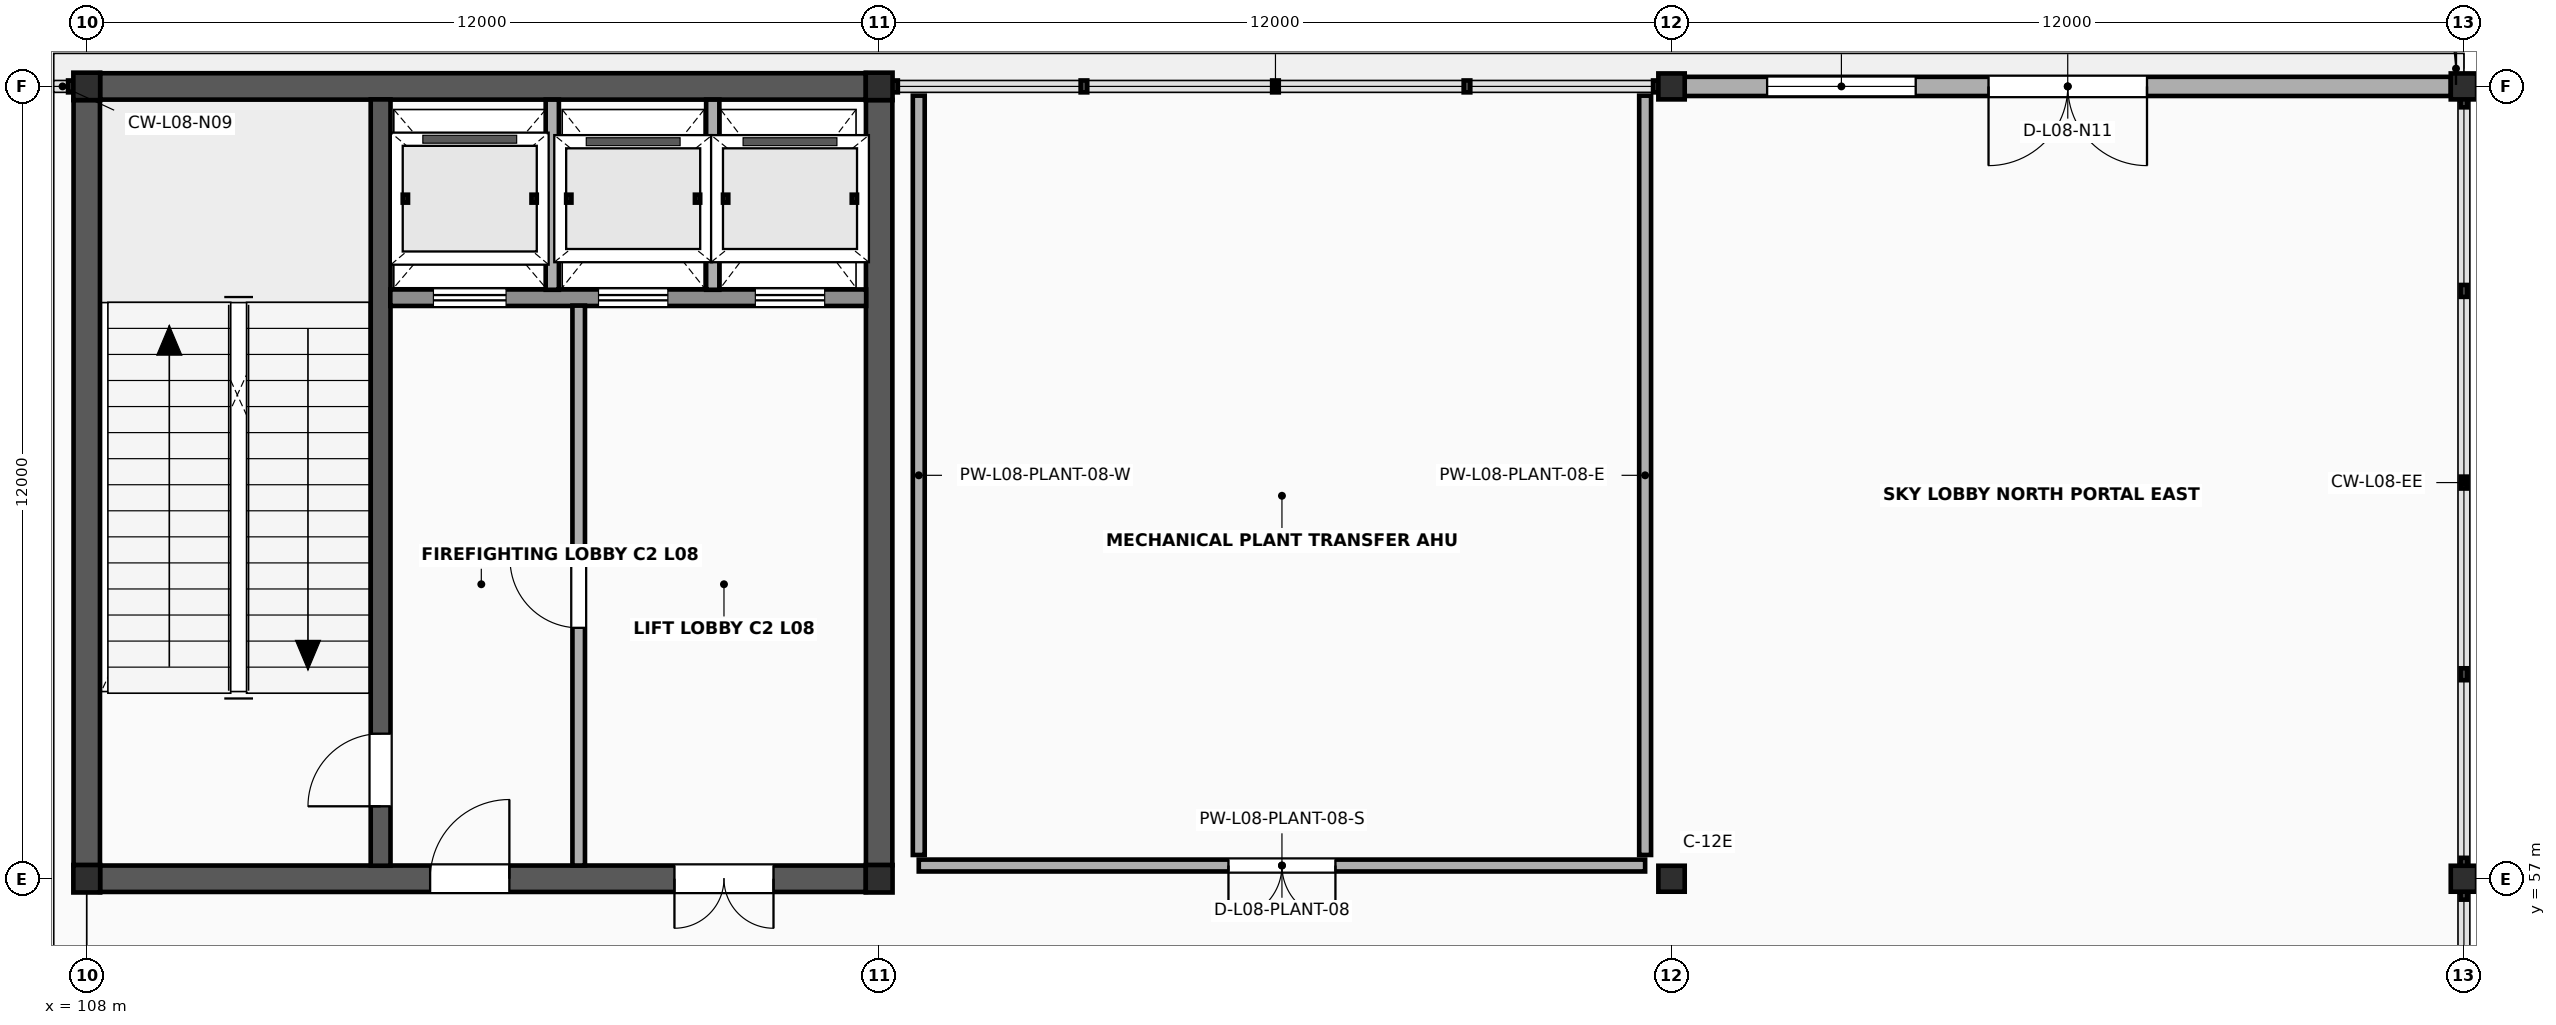
"""IFC4 building model, lengths in metres.
Left out: names, types, materials, properties, quantities, classifications, styles, units other than length and angle.
Written with IfcOpenShell. Run it as: python <this file> out.ifc"""

import sys

from ifc_helpers import new_model, si_unit, direction, frame, frame_2d, origin, origin_2d, place, context, subcontext, project, spatial, rectangle, i_section, extrude, element, fill, save


model = new_model("IFC4")
c1 = context("Model", 3, precision=1e-05, world=origin(), true_north=direction((0.0, 1.0)))
c2 = subcontext(c1, "Body", "Model", "MODEL_VIEW")
j1 = project(units=[si_unit("LENGTHUNIT", "METRE"), si_unit("PLANEANGLEUNIT", "RADIAN")], contexts=[c1])
p1 = place(None, origin())
s1 = spatial("IfcSite", under=j1, at=p1, CompositionType="ELEMENT")
p2 = place(p1, origin())
s2 = spatial("IfcBuilding", under=s1, at=p2, CompositionType="ELEMENT")
p3 = place(p2, frame((0.0, 0.0, 32.4)))
s3 = spatial("IfcBuildingStorey", under=s2, at=p3, CompositionType="ELEMENT", Elevation=32.4)
for number, where, z_axis, x_axis in (
    (1, (108.0, 57.0, 0.0), (0.0, 0.0, 1.0), (1.0, 0.0, 0.0)),
    (2, (108.0, 69.0, 0.0), (0.0, 0.0, 1.0), (1.0, 0.0, 0.0)),
    (3, (120.0, 57.0, 0.0), (0.0, 0.0, 1.0), (1.0, 0.0, 0.0)),
    (4, (120.0, 69.0, 0.0), (0.0, 0.0, 1.0), (1.0, 0.0, 0.0)),
):
    element("IfcColumn", number, at=place(p3, frame(where, z_axis=z_axis, x_axis=x_axis)), inside=s3, PredefinedType="COLUMN", context=c2, shape_type="SweptSolid", body=[
        extrude(i_section(OverallWidth=0.406, OverallDepth=0.416, WebThickness=0.03, FlangeThickness=0.048, FilletRadius=0.018, at=origin_2d()), origin(), (0.0, 0.0, 1.0), 5.2),
    ])
for number, where, z_axis, x_axis in (
    (5, (132.0, 57.0, 0.0), (0.0, 0.0, 1.0), (1.0, 0.0, 0.0)),
    (6, (132.0, 69.0, 0.0), (0.0, 0.0, 1.0), (1.0, 0.0, 0.0)),
    (7, (144.0, 57.0, 0.0), (0.0, 0.0, 1.0), (1.0, 0.0, 0.0)),
    (8, (144.0, 69.0, 0.0), (0.0, 0.0, 1.0), (1.0, 0.0, 0.0)),
):
    element("IfcColumn", number, at=place(p3, frame(where, z_axis=z_axis, x_axis=x_axis)), inside=s3, PredefinedType="COLUMN", context=c2, shape_type="SweptSolid", body=[
        extrude(i_section(OverallWidth=0.399, OverallDepth=0.393, WebThickness=0.023, FlangeThickness=0.037, FilletRadius=0.018, at=origin_2d()), origin(), (0.0, 0.0, 1.0), 5.2),
    ])
p4 = place(p3, frame((108.2, 57.0, 0.0), z_axis=(0.0, 0.0, 1.0), x_axis=(1.0, 0.0, 0.0)))
e9 = element("IfcWall", 9, at=p4, inside=s3, PredefinedType="SHEAR", context=c2, shape_type="SweptSolid", body=[
    extrude(rectangle(XDim=11.6, YDim=0.4, at=frame_2d((5.8, 0.0))), origin(), (0.0, 0.0, 1.0), 5.043),
])
p5 = place(p4, frame((5.0, 0.0, 0.0)))
e10 = element("IfcOpeningElement", 10, at=p5, cuts=e9, PredefinedType="OPENING", context=c2, shape_type="SweptSolid", body=[
    extrude(rectangle(XDim=1.2, YDim=2.2, at=frame_2d((0.6, 1.1))), frame((0.0, 0.215, 0.0), z_axis=(0.0, -1.0, 0.0), x_axis=(1.0, 0.0, 0.0)), (0.0, 0.0, 1.0), 0.43),
])
p6 = place(p4, frame((8.7, 0.0, 0.0)))
e11 = element("IfcOpeningElement", 11, at=p6, cuts=e9, PredefinedType="OPENING", context=c2, shape_type="SweptSolid", body=[
    extrude(rectangle(XDim=1.5, YDim=2.25, at=frame_2d((0.75, 1.125))), frame((0.0, 0.215, 0.0), z_axis=(0.0, -1.0, 0.0), x_axis=(1.0, 0.0, 0.0)), (0.0, 0.0, 1.0), 0.43),
])
p7 = place(p3, frame((108.2, 69.0, 0.0), z_axis=(0.0, 0.0, 1.0), x_axis=(1.0, 0.0, 0.0)))
e12 = element("IfcWall", 12, at=p7, inside=s3, PredefinedType="SHEAR", context=c2, shape_type="SweptSolid", body=[
    extrude(rectangle(XDim=11.6, YDim=0.4, at=frame_2d((5.8, 0.0))), origin(), (0.0, 0.0, 1.0), 5.043),
])
for number, where, z_axis, x_axis in (
    (13, (108.0, 57.205, 0.0), (0.0, 0.0, 1.0), (0.0, 1.0, 0.0)),
    (14, (120.0, 57.205, 0.0), (0.0, 0.0, 1.0), (0.0, 1.0, 0.0)),
):
    element("IfcWall", number, at=place(p3, frame(where, z_axis=z_axis, x_axis=x_axis)), inside=s3, PredefinedType="SHEAR", context=c2, shape_type="SweptSolid", body=[
        extrude(rectangle(XDim=11.59, YDim=0.4, at=frame_2d((5.795, 0.0))), origin(), (0.0, 0.0, 1.0), 5.043),
    ])
p8 = place(p3, frame((112.45, 57.197, 0.0), z_axis=(0.0, 0.0, 1.0), x_axis=(0.0, 1.0, 0.0)))
e15 = element("IfcWall", 15, at=p8, inside=s3, PredefinedType="SHEAR", context=c2, shape_type="SweptSolid", body=[
    extrude(rectangle(XDim=11.606, YDim=0.3, at=frame_2d((5.803, 0.0))), origin(), (0.0, 0.0, 1.0), 5.043),
])
p9 = place(p8, frame((0.9, 0.0, 0.0)))
e16 = element("IfcOpeningElement", 16, at=p9, cuts=e15, PredefinedType="OPENING", context=c2, shape_type="SweptSolid", body=[
    extrude(rectangle(XDim=1.1, YDim=2.2, at=frame_2d((0.55, 1.1))), frame((0.0, 0.165, 0.0), z_axis=(0.0, -1.0, 0.0), x_axis=(1.0, 0.0, 0.0)), (0.0, 0.0, 1.0), 0.33),
])
p10 = place(p3, frame((112.597, 65.8, 0.0), z_axis=(0.0, 0.0, 1.0), x_axis=(1.0, 0.0, 0.0)))
e17 = element("IfcWall", 17, at=p10, inside=s3, PredefinedType="SOLIDWALL", context=c2, shape_type="SweptSolid", body=[
    extrude(rectangle(XDim=7.206, YDim=0.25, at=frame_2d((3.603, 0.0))), origin(), (0.0, 0.0, 1.0), 5.043),
])
p11 = place(p10, frame((0.653, 0.0, 0.0)))
e18 = element("IfcOpeningElement", 18, at=p11, cuts=e17, PredefinedType="OPENING", context=c2, shape_type="SweptSolid", body=[
    extrude(rectangle(XDim=1.1, YDim=2.24, at=frame_2d((0.55, 1.12))), frame((0.0, 0.14, 0.0), z_axis=(0.0, -1.0, 0.0), x_axis=(1.0, 0.0, 0.0)), (0.0, 0.0, 1.0), 0.28),
])
p12 = place(p10, frame((3.153, 0.0, 0.0)))
e19 = element("IfcOpeningElement", 19, at=p12, cuts=e17, PredefinedType="OPENING", context=c2, shape_type="SweptSolid", body=[
    extrude(rectangle(XDim=1.05, YDim=2.2, at=frame_2d((0.525, 1.1))), frame((0.0, 0.14, 0.0), z_axis=(0.0, -1.0, 0.0), x_axis=(1.0, 0.0, 0.0)), (0.0, 0.0, 1.0), 0.28),
])
p13 = place(p10, frame((5.528, 0.0, 0.0)))
e20 = element("IfcOpeningElement", 20, at=p13, cuts=e17, PredefinedType="OPENING", context=c2, shape_type="SweptSolid", body=[
    extrude(rectangle(XDim=1.05, YDim=2.2, at=frame_2d((0.525, 1.1))), frame((0.0, 0.14, 0.0), z_axis=(0.0, -1.0, 0.0), x_axis=(1.0, 0.0, 0.0)), (0.0, 0.0, 1.0), 0.28),
])
for number, where, z_axis, x_axis in (
    (21, (115.05, 65.92, 0.0), (0.0, 0.0, 1.0), (0.0, 1.0, 0.0)),
    (22, (117.48, 65.92, 0.0), (0.0, 0.0, 1.0), (0.0, 1.0, 0.0)),
):
    element("IfcWall", number, at=place(p3, frame(where, z_axis=z_axis, x_axis=x_axis)), inside=s3, PredefinedType="SOLIDWALL", context=c2, shape_type="SweptSolid", body=[
        extrude(rectangle(XDim=2.88, YDim=0.2, at=frame_2d((1.44, 0.0))), origin(), (0.0, 0.0, 1.0), 5.033),
    ])
p14 = place(p3, frame((115.45, 57.2, 0.0), z_axis=(0.0, 0.0, 1.0), x_axis=(0.0, 1.0, 0.0)))
e23 = element("IfcWall", 23, at=p14, inside=s3, PredefinedType="SOLIDWALL", context=c2, shape_type="SweptSolid", body=[
    extrude(rectangle(XDim=8.48, YDim=0.19, at=frame_2d((4.24, 0.0))), origin(), (0.0, 0.0, 1.0), 5.033),
])
p15 = place(p14, frame((3.6, 0.0, 0.0)))
e24 = element("IfcOpeningElement", 24, at=p15, cuts=e23, PredefinedType="OPENING", context=c2, shape_type="SweptSolid", body=[
    extrude(rectangle(XDim=1.04, YDim=2.18, at=frame_2d((0.52, 1.09))), frame((0.0, 0.11, 0.0), z_axis=(0.0, -1.0, 0.0), x_axis=(1.0, 0.0, 0.0)), (0.0, 0.0, 1.0), 0.22),
])
p16 = place(p3, frame((132.198, 69.0, 0.0), z_axis=(0.0, 0.0, 1.0), x_axis=(1.0, 0.0, 0.0)))
e25 = element("IfcWall", 25, at=p16, inside=s3, PredefinedType="SOLIDWALL", context=c2, shape_type="SweptSolid", body=[
    extrude(rectangle(XDim=11.605, YDim=0.29, at=frame_2d((5.802, 0.0))), origin(), (0.0, 0.0, 1.0), 4.1),
])
p17 = place(p16, frame((4.603, 0.0, 0.0)))
e26 = element("IfcOpeningElement", 26, at=p17, cuts=e25, PredefinedType="OPENING", context=c2, shape_type="SweptSolid", body=[
    extrude(rectangle(XDim=2.4, YDim=2.54, at=frame_2d((1.2, 1.27))), frame((0.0, 0.16, 0.0), z_axis=(0.0, -1.0, 0.0), x_axis=(1.0, 0.0, 0.0)), (0.0, 0.0, 1.0), 0.32),
])
p18 = place(p16, frame((1.25, 0.0, 1.95)))
e27 = element("IfcOpeningElement", 27, at=p18, cuts=e25, PredefinedType="OPENING", context=c2, shape_type="SweptSolid", body=[
    extrude(rectangle(XDim=2.25, YDim=0.88, at=frame_2d((1.125, 0.44))), frame((0.0, 0.16, 0.0), z_axis=(0.0, -1.0, 0.0), x_axis=(1.0, 0.0, 0.0)), (0.0, 0.0, 1.0), 0.32),
])
p19 = place(p3, frame((120.6, 57.2, 0.0), z_axis=(0.0, 0.0, 1.0), x_axis=(1.0, 0.0, 0.0)))
e28 = element("IfcWall", 28, at=p19, inside=s3, PredefinedType="SOLIDWALL", context=c2, shape_type="SweptSolid", body=[
    extrude(rectangle(XDim=11.0, YDim=0.18, at=frame_2d((5.5, 0.0))), origin(), (0.0, 0.0, 1.0), 2.88),
])
p20 = place(p19, frame((4.69, 0.0, 0.0)))
e29 = element("IfcOpeningElement", 29, at=p20, cuts=e28, PredefinedType="OPENING", context=c2, shape_type="SweptSolid", body=[
    extrude(rectangle(XDim=1.62, YDim=2.3, at=frame_2d((0.81, 1.15))), frame((0.0, 0.105, 0.0), z_axis=(0.0, -1.0, 0.0), x_axis=(1.0, 0.0, 0.0)), (0.0, 0.0, 1.0), 0.21),
])
for number, where, z_axis, x_axis in (
    (30, (120.6, 57.36, 0.0), (0.0, 0.0, 1.0), (0.0, 1.0, 0.0)),
    (31, (131.6, 57.36, 0.0), (0.0, 0.0, 1.0), (0.0, 1.0, 0.0)),
):
    element("IfcWall", number, at=place(p3, frame(where, z_axis=z_axis, x_axis=x_axis)), inside=s3, PredefinedType="SOLIDWALL", context=c2, shape_type="SweptSolid", body=[
        extrude(rectangle(XDim=11.5, YDim=0.18, at=frame_2d((5.75, 0.0))), origin(), (0.0, 0.0, 1.0), 2.88),
    ])
p21 = place(p17, origin())
e32 = element("IfcDoor", 32, at=p21, inside=s3, OperationType="DOUBLE_DOOR_SINGLE_SWING", PredefinedType="DOOR", context=c2, shape_type="SweptSolid", body=[
    extrude(rectangle(XDim=2.4, YDim=2.54, at=frame_2d((1.2, 1.27))), frame((0.0, 0.025, 0.0), z_axis=(0.0, -1.0, 0.0), x_axis=(1.0, 0.0, 0.0)), (0.0, 0.0, 1.0), 0.05),
])
fill(e26, e32)
p22 = place(p18, origin())
e33 = element("IfcWindow", 33, at=p22, inside=s3, PartitioningType="DOUBLE_PANEL_VERTICAL", PredefinedType="USERDEFINED", context=c2, shape_type="SweptSolid", body=[
    extrude(rectangle(XDim=2.25, YDim=0.88, at=frame_2d((1.125, 0.44))), frame((0.0, 0.03, 0.0), z_axis=(0.0, -1.0, 0.0), x_axis=(1.0, 0.0, 0.0)), (0.0, 0.0, 1.0), 0.06),
])
fill(e27, e33)
p23 = place(p9, origin())
e34 = element("IfcDoor", 34, at=p23, inside=s3, OperationType="SINGLE_SWING_LEFT", PredefinedType="DOOR", context=c2, shape_type="SweptSolid", body=[
    extrude(rectangle(XDim=1.1, YDim=2.2, at=frame_2d((0.55, 1.1))), frame((0.0, 0.025, 0.0), z_axis=(0.0, -1.0, 0.0), x_axis=(1.0, 0.0, 0.0)), (0.0, 0.0, 1.0), 0.05),
])
fill(e16, e34)
p24 = place(p15, origin())
e35 = element("IfcDoor", 35, at=p24, inside=s3, OperationType="SINGLE_SWING_RIGHT", PredefinedType="DOOR", context=c2, shape_type="SweptSolid", body=[
    extrude(rectangle(XDim=1.04, YDim=2.18, at=frame_2d((0.52, 1.09))), frame((0.0, 0.025, 0.0), z_axis=(0.0, -1.0, 0.0), x_axis=(1.0, 0.0, 0.0)), (0.0, 0.0, 1.0), 0.05),
])
fill(e24, e35)
p25 = place(p5, origin())
e36 = element("IfcDoor", 36, at=p25, inside=s3, OperationType="SINGLE_SWING_RIGHT", PredefinedType="DOOR", context=c2, shape_type="SweptSolid", body=[
    extrude(rectangle(XDim=1.2, YDim=2.2, at=frame_2d((0.6, 1.1))), frame((0.0, 0.025, 0.0), z_axis=(0.0, -1.0, 0.0), x_axis=(1.0, 0.0, 0.0)), (0.0, 0.0, 1.0), 0.05),
])
fill(e10, e36)
p26 = place(p6, origin())
e37 = element("IfcDoor", 37, at=p26, inside=s3, OperationType="DOUBLE_DOOR_SINGLE_SWING", PredefinedType="DOOR", context=c2, shape_type="SweptSolid", body=[
    extrude(rectangle(XDim=1.5, YDim=2.25, at=frame_2d((0.75, 1.125))), frame((0.0, 0.025, 0.0), z_axis=(0.0, -1.0, 0.0), x_axis=(1.0, 0.0, 0.0)), (0.0, 0.0, 1.0), 0.05),
])
fill(e11, e37)
p27 = place(p11, origin())
e38 = element("IfcDoor", 38, at=p27, inside=s3, OperationType="SLIDING_TO_LEFT", PredefinedType="USERDEFINED", context=c2, shape_type="SweptSolid", body=[
    extrude(rectangle(XDim=1.1, YDim=2.24, at=frame_2d((0.55, 1.12))), frame((0.0, 0.025, 0.0), z_axis=(0.0, -1.0, 0.0), x_axis=(1.0, 0.0, 0.0)), (0.0, 0.0, 1.0), 0.05),
])
fill(e18, e38)
p28 = place(p12, origin())
e39 = element("IfcDoor", 39, at=p28, inside=s3, OperationType="SLIDING_TO_LEFT", PredefinedType="USERDEFINED", context=c2, shape_type="SweptSolid", body=[
    extrude(rectangle(XDim=1.05, YDim=2.2, at=frame_2d((0.525, 1.1))), frame((0.0, 0.025, 0.0), z_axis=(0.0, -1.0, 0.0), x_axis=(1.0, 0.0, 0.0)), (0.0, 0.0, 1.0), 0.05),
])
fill(e19, e39)
p29 = place(p13, origin())
e40 = element("IfcDoor", 40, at=p29, inside=s3, OperationType="SLIDING_TO_LEFT", PredefinedType="USERDEFINED", context=c2, shape_type="SweptSolid", body=[
    extrude(rectangle(XDim=1.05, YDim=2.2, at=frame_2d((0.525, 1.1))), frame((0.0, 0.025, 0.0), z_axis=(0.0, -1.0, 0.0), x_axis=(1.0, 0.0, 0.0)), (0.0, 0.0, 1.0), 0.05),
])
fill(e20, e40)
p30 = place(p20, origin())
e41 = element("IfcDoor", 41, at=p30, inside=s3, OperationType="DOUBLE_DOOR_SINGLE_SWING", PredefinedType="DOOR", context=c2, shape_type="SweptSolid", body=[
    extrude(rectangle(XDim=1.62, YDim=2.3, at=frame_2d((0.81, 1.15))), frame((0.0, 0.025, 0.0), z_axis=(0.0, -1.0, 0.0), x_axis=(1.0, 0.0, 0.0)), (0.0, 0.0, 1.0), 0.05),
])
fill(e29, e41)
save(model, sys.argv[1])
